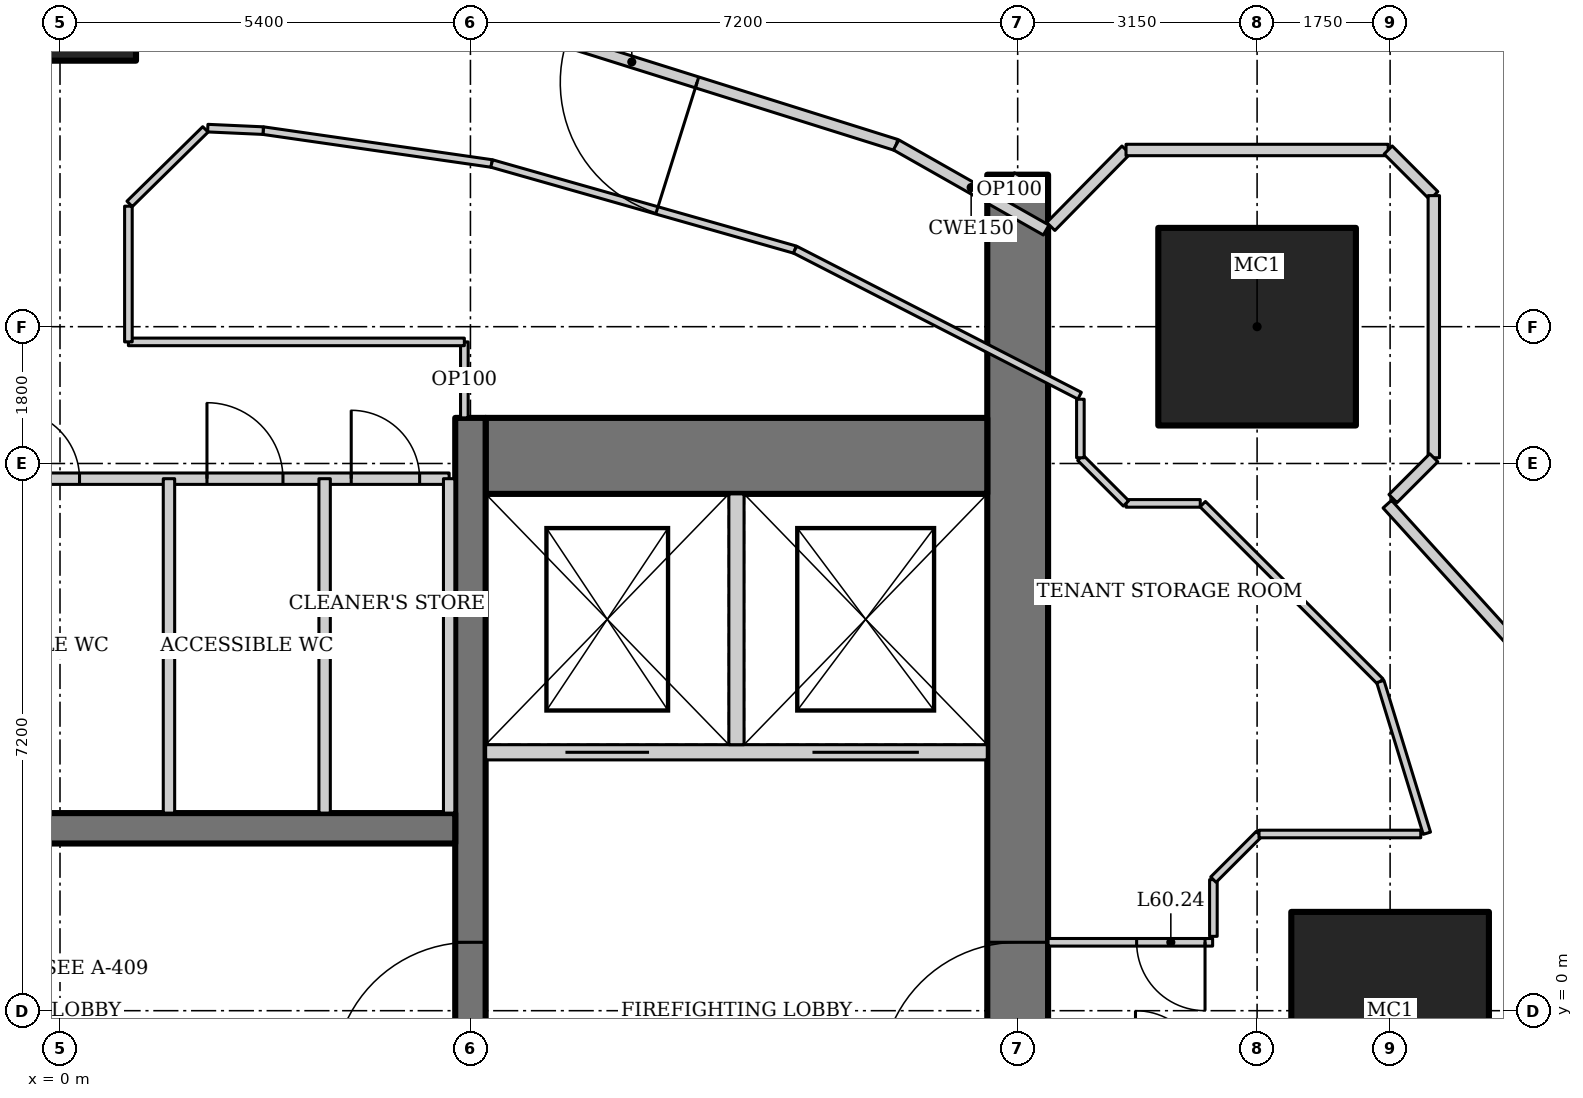
"""IFC4 building model, lengths in metres.
Left out: names, types, materials, properties, quantities, classifications, styles, units other than length and angle.
Written with IfcOpenShell. Run it as: python <this file> out.ifc"""

import sys

from ifc_helpers import new_model, si_unit, direction, frame, frame_2d, origin, origin_2d, place, context, subcontext, project, spatial, rectangle, hollow_rectangle, extrude, element, fill, save


model = new_model("IFC4")
c1 = context("Model", 3, precision=1e-05, world=origin(), true_north=direction((0.0, 1.0)))
c2 = subcontext(c1, "Body", "Model", "MODEL_VIEW")
j1 = project(units=[si_unit("LENGTHUNIT", "METRE"), si_unit("PLANEANGLEUNIT", "RADIAN")], contexts=[c1])
p1 = place(None, origin())
s1 = spatial("IfcSite", under=j1, at=p1, CompositionType="ELEMENT")
p2 = place(p1, origin())
s2 = spatial("IfcBuilding", under=s1, at=p2, CompositionType="ELEMENT")
p3 = place(p2, frame((0.0, 0.0, 257.8)))
s3 = spatial("IfcBuildingStorey", under=s2, at=p3, CompositionType="ELEMENT", Elevation=257.8)
for number, where, z_axis, x_axis in (
    (1, (17.5, 0.0, 0.0), (0.0, 0.0, 1.0), (1.0, 0.0, 0.0)),
    (2, (15.75, 9.0, 0.0), (0.0, 0.0, 1.0), (1.0, 0.0, 0.0)),
):
    element("IfcColumn", number, at=place(p3, frame(where, z_axis=z_axis, x_axis=x_axis)), inside=s3, PredefinedType="COLUMN", context=c2, shape_type="SweptSolid", body=[
        extrude(hollow_rectangle(XDim=2.6, YDim=2.6, WallThickness=0.13, at=origin_2d()), origin(), (0.0, 0.0, 1.0), 4.2),
    ])
p4 = place(p3, frame((0.0, 13.5, 0.0), z_axis=(0.0, 0.0, 1.0), x_axis=(1.0, 0.0, 0.0)))
e3 = element("IfcColumn", 3, at=p4, inside=s3, PredefinedType="COLUMN", context=c2, shape_type="SweptSolid", body=[
    extrude(hollow_rectangle(XDim=2.0, YDim=2.0, WallThickness=0.17, at=origin_2d()), origin(), (0.0, 0.0, 1.0), 4.2),
])
p5 = place(p3, frame((12.6, -11.0, 0.0), z_axis=(0.0, 0.0, 1.0), x_axis=(0.0, 1.0, 0.0)))
e4 = element("IfcWall", 4, at=p5, inside=s3, PredefinedType="SHEAR", context=c2, shape_type="SweptSolid", body=[
    extrude(rectangle(XDim=22.0, YDim=0.8, at=frame_2d((11.0, 0.0))), origin(), (0.0, 0.0, 1.0), 4.2),
])
p6 = place(p5, frame((10.1, 0.0, 0.0)))
e5 = element("IfcOpeningElement", 5, at=p6, cuts=e4, PredefinedType="OPENING", context=c2, shape_type="SweptSolid", body=[
    extrude(rectangle(XDim=1.8, YDim=2.1, at=frame_2d((0.9, 1.05))), frame((0.0, 0.41, 0.0), z_axis=(0.0, -1.0, 0.0), x_axis=(1.0, 0.0, 0.0)), (0.0, 0.0, 1.0), 0.82),
])
p7 = place(p3, frame((12.2, 7.3, 0.0), z_axis=(0.0, 0.0, 1.0), x_axis=(-1.0, 0.0, 0.0)))
e6 = element("IfcWall", 6, at=p7, inside=s3, PredefinedType="SHEAR", context=c2, shape_type="SweptSolid", body=[
    extrude(rectangle(XDim=6.6, YDim=1.0, at=frame_2d((3.3, 0.0))), origin(), (0.0, 0.0, 1.0), 4.2),
])
p8 = place(p3, frame((5.4, -6.8, 0.0), z_axis=(0.0, 0.0, 1.0), x_axis=(0.0, 1.0, 0.0)))
e7 = element("IfcWall", 7, at=p8, inside=s3, PredefinedType="SHEAR", context=c2, shape_type="SweptSolid", body=[
    extrude(rectangle(XDim=14.6, YDim=0.4, at=frame_2d((7.3, 0.0))), origin(), (0.0, 0.0, 1.0), 4.2),
])
p9 = place(p8, frame((5.9, 0.0, 0.0)))
e8 = element("IfcOpeningElement", 8, at=p9, cuts=e7, PredefinedType="OPENING", context=c2, shape_type="SweptSolid", body=[
    extrude(rectangle(XDim=1.8, YDim=2.1, at=frame_2d((0.9, 1.05))), frame((0.0, 0.21, 0.0), z_axis=(0.0, -1.0, 0.0), x_axis=(1.0, 0.0, 0.0)), (0.0, 0.0, 1.0), 0.42),
])
p10 = place(p3, frame((5.2, 2.4, 0.0), z_axis=(0.0, 0.0, 1.0), x_axis=(-1.0, 0.0, 0.0)))
e9 = element("IfcWall", 9, at=p10, inside=s3, PredefinedType="SHEAR", context=c2, shape_type="SweptSolid", body=[
    extrude(rectangle(XDim=10.4, YDim=0.4, at=frame_2d((5.2, 0.0))), origin(), (0.0, 0.0, 1.0), 4.2),
])
p11 = place(p3, frame((12.2, 3.4, 0.0), z_axis=(0.0, 0.0, 1.0), x_axis=(-1.0, 0.0, 0.0)))
e10 = element("IfcWall", 10, at=p11, inside=s3, PredefinedType="SOLIDWALL", context=c2, shape_type="SweptSolid", body=[
    extrude(rectangle(XDim=6.6, YDim=0.2, at=frame_2d((3.3, 0.0))), origin(), (0.0, 0.0, 1.0), 4.2),
])
p12 = place(p11, frame((4.45, 0.0, 0.0)))
e11 = element("IfcOpeningElement", 11, at=p12, cuts=e10, PredefinedType="OPENING", context=c2, shape_type="SweptSolid", body=[
    extrude(rectangle(XDim=1.1, YDim=2.2, at=frame_2d((0.55, 1.1))), frame((0.0, 0.11, 0.0), z_axis=(0.0, -1.0, 0.0), x_axis=(1.0, 0.0, 0.0)), (0.0, 0.0, 1.0), 0.22),
])
p13 = place(p11, frame((0.9, 0.0, 0.0)))
e12 = element("IfcOpeningElement", 12, at=p13, cuts=e10, PredefinedType="OPENING", context=c2, shape_type="SweptSolid", body=[
    extrude(rectangle(XDim=1.4, YDim=2.2, at=frame_2d((0.7, 1.1))), frame((0.0, 0.11, 0.0), z_axis=(0.0, -1.0, 0.0), x_axis=(1.0, 0.0, 0.0)), (0.0, 0.0, 1.0), 0.22),
])
p14 = place(p3, frame((8.9, 3.5, 0.0), z_axis=(0.0, 0.0, 1.0), x_axis=(0.0, 1.0, 0.0)))
e13 = element("IfcWall", 13, at=p14, inside=s3, PredefinedType="SOLIDWALL", context=c2, shape_type="SweptSolid", body=[
    extrude(rectangle(XDim=3.3, YDim=0.2, at=frame_2d((1.65, 0.0))), origin(), (0.0, 0.0, 1.0), 4.2),
])
p15 = place(p3, frame((11.001, 11.392, 0.0), z_axis=(0.0, 0.0, 1.0), x_axis=(-0.954031103669, 0.299707612903, 0.0)))
e14 = element("IfcWall", 14, at=p15, inside=s3, PredefinedType="PARTITIONING", context=c2, shape_type="SweptSolid", body=[
    extrude(rectangle(XDim=4.695, YDim=0.15, at=frame_2d((2.348, 0.0))), origin(), (0.0, 0.0, 1.0), 4.05),
])
p16 = place(p15, frame((2.745, 0.0, 0.0)))
e15 = element("IfcOpeningElement", 15, at=p16, cuts=e14, PredefinedType="OPENING", context=c2, shape_type="SweptSolid", body=[
    extrude(rectangle(XDim=1.8, YDim=2.1, at=frame_2d((0.9, 1.05))), frame((0.0, 0.085, 0.0), z_axis=(0.0, -1.0, 0.0), x_axis=(1.0, 0.0, 0.0)), (0.0, 0.0, 1.0), 0.17),
])
p17 = place(p3, frame((-5.12, 7.0, 0.0), z_axis=(0.0, 0.0, 1.0), x_axis=(1.0, 0.0, 0.0)))
e16 = element("IfcWall", 16, at=p17, inside=s3, PredefinedType="SOLIDWALL", context=c2, shape_type="SweptSolid", body=[
    extrude(rectangle(XDim=10.24, YDim=0.15, at=frame_2d((5.12, 0.0))), origin(), (0.0, 0.0, 1.0), 4.05),
])
p18 = place(p17, frame((1.2, 0.0, 0.0)))
e17 = element("IfcOpeningElement", 17, at=p18, cuts=e16, PredefinedType="OPENING", context=c2, shape_type="SweptSolid", body=[
    extrude(rectangle(XDim=0.9, YDim=2.1, at=frame_2d((0.45, 1.05))), frame((0.0, 0.085, 0.0), z_axis=(0.0, -1.0, 0.0), x_axis=(1.0, 0.0, 0.0)), (0.0, 0.0, 1.0), 0.17),
])
p19 = place(p17, frame((4.477, 0.0, 0.0)))
e18 = element("IfcOpeningElement", 18, at=p19, cuts=e16, PredefinedType="OPENING", context=c2, shape_type="SweptSolid", body=[
    extrude(rectangle(XDim=0.9, YDim=2.1, at=frame_2d((0.45, 1.05))), frame((0.0, 0.085, 0.0), z_axis=(0.0, -1.0, 0.0), x_axis=(1.0, 0.0, 0.0)), (0.0, 0.0, 1.0), 0.17),
])
p20 = place(p17, frame((7.054, 0.0, 0.0)))
e19 = element("IfcOpeningElement", 19, at=p20, cuts=e16, PredefinedType="OPENING", context=c2, shape_type="SweptSolid", body=[
    extrude(rectangle(XDim=1.0, YDim=2.1, at=frame_2d((0.5, 1.05))), frame((0.0, 0.085, 0.0), z_axis=(0.0, -1.0, 0.0), x_axis=(1.0, 0.0, 0.0)), (0.0, 0.0, 1.0), 0.17),
])
p21 = place(p17, frame((8.952, 0.0, 0.0)))
e20 = element("IfcOpeningElement", 20, at=p21, cuts=e16, PredefinedType="OPENING", context=c2, shape_type="SweptSolid", body=[
    extrude(rectangle(XDim=0.9, YDim=2.1, at=frame_2d((0.45, 1.05))), frame((0.0, 0.085, 0.0), z_axis=(0.0, -1.0, 0.0), x_axis=(1.0, 0.0, 0.0)), (0.0, 0.0, 1.0), 0.17),
])
p22 = place(p3, frame((5.12, 2.6, 0.0), z_axis=(0.0, 0.0, 1.0), x_axis=(0.0, 1.0, 0.0)))
e21 = element("IfcWall", 21, at=p22, inside=s3, PredefinedType="SOLIDWALL", context=c2, shape_type="SweptSolid", body=[
    extrude(rectangle(XDim=4.4, YDim=0.15, at=frame_2d((2.2, 0.0))), origin(), (0.0, 0.0, 1.0), 4.05),
])
p23 = place(p3, frame((1.434, 2.6, 0.0), z_axis=(0.0, 0.0, 1.0), x_axis=(0.0, 1.0, 0.0)))
e22 = element("IfcWall", 22, at=p23, inside=s3, PredefinedType="SOLIDWALL", context=c2, shape_type="SweptSolid", body=[
    extrude(rectangle(XDim=4.4, YDim=0.15, at=frame_2d((2.2, 0.0))), origin(), (0.0, 0.0, 1.0), 3.108),
])
p24 = place(p3, frame((3.482, 2.6, 0.0), z_axis=(0.0, 0.0, 1.0), x_axis=(0.0, 1.0, 0.0)))
e23 = element("IfcWall", 23, at=p24, inside=s3, PredefinedType="SOLIDWALL", context=c2, shape_type="SweptSolid", body=[
    extrude(rectangle(XDim=4.4, YDim=0.15, at=frame_2d((2.2, 0.0))), origin(), (0.0, 0.0, 1.0), 4.05),
])
p25 = place(p3, frame((5.32, 7.8, 0.0), z_axis=(0.0, 0.0, 1.0), x_axis=(0.0, 1.0, 0.0)))
e24 = element("IfcWall", 24, at=p25, inside=s3, PredefinedType="PARTITIONING", context=c2, shape_type="SweptSolid", body=[
    extrude(rectangle(XDim=1.0, YDim=0.1, at=frame_2d((0.5, 0.0))), origin(), (0.0, 0.0, 1.0), 4.05),
])
p26 = place(p3, frame((5.32, 8.8, 0.0), z_axis=(0.0, 0.0, 1.0), x_axis=(-1.0, 0.0, 0.0)))
e25 = element("IfcWall", 25, at=p26, inside=s3, PredefinedType="PARTITIONING", context=c2, shape_type="SweptSolid", body=[
    extrude(rectangle(XDim=4.42, YDim=0.1, at=frame_2d((2.21, 0.0))), origin(), (0.0, 0.0, 1.0), 4.05),
])
p27 = place(p3, frame((2.673, 11.58, 0.0), z_axis=(0.0, 0.0, 1.0), x_axis=(0.989805921373, -0.142422744025, 0.0)))
e26 = element("IfcWall", 26, at=p27, inside=s3, PredefinedType="PARTITIONING", context=c2, shape_type="SweptSolid", body=[
    extrude(rectangle(XDim=3.038, YDim=0.1, at=frame_2d((1.519, 0.0))), origin(), (0.0, 0.0, 1.0), 4.05),
])
p28 = place(p3, frame((5.68, 11.147, 0.0), z_axis=(0.0, 0.0, 1.0), x_axis=(0.961973498971, -0.273142796496, 0.0)))
e27 = element("IfcWall", 27, at=p28, inside=s3, PredefinedType="PARTITIONING", context=c2, shape_type="SweptSolid", body=[
    extrude(rectangle(XDim=4.148, YDim=0.1, at=frame_2d((2.074, 0.0))), origin(), (0.0, 0.0, 1.0), 4.05),
])
p29 = place(p3, frame((12.6, 11.0, 0.0), z_axis=(0.0, 0.0, 1.0), x_axis=(-0.493794495037, -0.869578631678, 0.0)))
e28 = element("IfcWall", 28, at=p29, inside=s3, PredefinedType="PARTITIONING", context=c2, shape_type="SweptSolid", body=[
    extrude(rectangle(XDim=0.449, YDim=0.1, at=frame_2d((0.225, 0.0))), origin(), (0.0, 0.0, 1.0), 4.05),
])
p30 = place(p3, frame((0.9, 8.8, 0.0), z_axis=(0.0, 0.0, 1.0), x_axis=(0.0, 1.0, 0.0)))
e29 = element("IfcWall", 29, at=p30, inside=s3, PredefinedType="PARTITIONING", context=c2, shape_type="SweptSolid", body=[
    extrude(rectangle(XDim=1.785, YDim=0.1, at=frame_2d((0.893, 0.0))), origin(), (0.0, 0.0, 1.0), 4.05),
])
p31 = place(p3, frame((1.944, 11.613, 0.0), z_axis=(0.0, 0.0, 1.0), x_axis=(0.99899525873, -0.04481599085, 0.0)))
e30 = element("IfcWall", 30, at=p31, inside=s3, PredefinedType="PARTITIONING", context=c2, shape_type="SweptSolid", body=[
    extrude(rectangle(XDim=0.73, YDim=0.1, at=frame_2d((0.365, 0.0))), origin(), (0.0, 0.0, 1.0), 4.05),
])
p32 = place(p3, frame((1.913, 11.596, 0.0), z_axis=(0.0, 0.0, 1.0), x_axis=(-0.71318945388, -0.70097132814, 0.0)))
e31 = element("IfcWall", 31, at=p32, inside=s3, PredefinedType="PARTITIONING", context=c2, shape_type="SweptSolid", body=[
    extrude(rectangle(XDim=1.399, YDim=0.1, at=frame_2d((0.699, 0.0))), origin(), (0.0, 0.0, 1.0), 4.05),
])
p33 = place(p3, frame((19.172, 4.78, 0.0), z_axis=(0.0, 0.0, 1.0), x_axis=(-0.671721890643, 0.74080341632, 0.0)))
e32 = element("IfcWall", 32, at=p33, inside=s3, PredefinedType="PARTITIONING", context=c2, shape_type="SweptSolid", body=[
    extrude(rectangle(XDim=2.544, YDim=0.15, at=frame_2d((1.272, 0.0))), origin(), (0.0, 0.0, 1.0), 4.05),
])
p34 = place(p3, frame((12.975, 10.271, 0.0), z_axis=(0.0, 0.0, 1.0), x_axis=(-0.869722107117, 0.493541747366, 0.0)))
e33 = element("IfcWall", 33, at=p34, inside=s3, PredefinedType="PARTITIONING", context=c2, shape_type="SweptSolid", body=[
    extrude(rectangle(XDim=2.27, YDim=0.15, at=frame_2d((1.135, 0.0))), origin(), (0.0, 0.0, 1.0), 4.05),
])
p35 = place(p3, frame((9.67, 10.014, 0.0), z_axis=(0.0, 0.0, 1.0), x_axis=(0.889620520549, -0.45670048108, 0.0)))
e34 = element("IfcWall", 34, at=p35, inside=s3, PredefinedType="PARTITIONING", context=c2, shape_type="SweptSolid", body=[
    extrude(rectangle(XDim=4.209, YDim=0.1, at=frame_2d((2.104, 0.0))), origin(), (0.0, 0.0, 1.0), 4.05),
])
p36 = place(p3, frame((15.035, 6.665, 0.0), z_axis=(0.0, 0.0, 1.0), x_axis=(0.707587114823, -0.70662612104, 0.0)))
e35 = element("IfcWall", 35, at=p36, inside=s3, PredefinedType="PARTITIONING", context=c2, shape_type="SweptSolid", body=[
    extrude(rectangle(XDim=3.303, YDim=0.1, at=frame_2d((1.651, 0.0))), origin(), (0.0, 0.0, 1.0), 4.05),
])
p37 = place(p3, frame((15.002, 6.675, 0.0), z_axis=(0.0, 0.0, 1.0), x_axis=(-1.0, 0.0, 0.0)))
e36 = element("IfcWall", 36, at=p37, inside=s3, PredefinedType="PARTITIONING", context=c2, shape_type="SweptSolid", body=[
    extrude(rectangle(XDim=0.977, YDim=0.1, at=frame_2d((0.488, 0.0))), origin(), (0.0, 0.0, 1.0), 4.05),
])
p38 = place(p3, frame((14.025, 6.675, 0.0), z_axis=(0.0, 0.0, 1.0), x_axis=(-0.707106781187, 0.707106781187, 0.0)))
e37 = element("IfcWall", 37, at=p38, inside=s3, PredefinedType="PARTITIONING", context=c2, shape_type="SweptSolid", body=[
    extrude(rectangle(XDim=0.849, YDim=0.1, at=frame_2d((0.425, 0.0))), origin(), (0.0, 0.0, 1.0), 4.05),
])
p39 = place(p3, frame((13.425, 7.275, 0.0), z_axis=(0.0, 0.0, 1.0), x_axis=(0.0, 1.0, 0.0)))
e38 = element("IfcWall", 38, at=p39, inside=s3, PredefinedType="PARTITIONING", context=c2, shape_type="SweptSolid", body=[
    extrude(rectangle(XDim=0.77, YDim=0.1, at=frame_2d((0.385, 0.0))), origin(), (0.0, 0.0, 1.0), 4.05),
])
p40 = place(p3, frame((13.036, 10.319, 0.0), z_axis=(0.0, 0.0, 1.0), x_axis=(0.701113567316, 0.713049623606, 0.0)))
e39 = element("IfcWall", 39, at=p40, inside=s3, PredefinedType="PARTITIONING", context=c2, shape_type="SweptSolid", body=[
    extrude(rectangle(XDim=1.411, YDim=0.15, at=frame_2d((0.706, 0.0))), origin(), (0.0, 0.0, 1.0), 4.05),
])
p41 = place(p3, frame((14.025, 11.325, 0.0), z_axis=(0.0, 0.0, 1.0), x_axis=(1.0, 0.0, 0.0)))
e40 = element("IfcWall", 40, at=p41, inside=s3, PredefinedType="PARTITIONING", context=c2, shape_type="SweptSolid", body=[
    extrude(rectangle(XDim=3.449, YDim=0.15, at=frame_2d((1.725, 0.0))), origin(), (0.0, 0.0, 1.0), 4.05),
])
p42 = place(p3, frame((17.475, 11.325, 0.0), z_axis=(0.0, 0.0, 1.0), x_axis=(0.707106781187, -0.707106781187, 0.0)))
e41 = element("IfcWall", 41, at=p42, inside=s3, PredefinedType="PARTITIONING", context=c2, shape_type="SweptSolid", body=[
    extrude(rectangle(XDim=0.849, YDim=0.15, at=frame_2d((0.425, 0.0))), origin(), (0.0, 0.0, 1.0), 4.05),
])
p43 = place(p3, frame((18.075, 10.725, 0.0), z_axis=(0.0, 0.0, 1.0), x_axis=(0.0, -1.0, 0.0)))
e42 = element("IfcWall", 42, at=p43, inside=s3, PredefinedType="PARTITIONING", context=c2, shape_type="SweptSolid", body=[
    extrude(rectangle(XDim=3.449, YDim=0.15, at=frame_2d((1.725, 0.0))), origin(), (0.0, 0.0, 1.0), 3.6),
])
p44 = place(p3, frame((18.075, 7.275, 0.0), z_axis=(0.0, 0.0, 1.0), x_axis=(-0.707106781187, -0.707106781187, 0.0)))
e43 = element("IfcWall", 43, at=p44, inside=s3, PredefinedType="PARTITIONING", context=c2, shape_type="SweptSolid", body=[
    extrude(rectangle(XDim=0.76, YDim=0.15, at=frame_2d((0.38, 0.0))), origin(), (0.0, 0.0, 1.0), 4.05),
])
p45 = place(p3, frame((17.372, 4.331, 0.0), z_axis=(0.0, 0.0, 1.0), x_axis=(0.293231279211, -0.956041535129, 0.0)))
e44 = element("IfcWall", 44, at=p45, inside=s3, PredefinedType="PARTITIONING", context=c2, shape_type="SweptSolid", body=[
    extrude(rectangle(XDim=2.088, YDim=0.1, at=frame_2d((1.044, 0.0))), origin(), (0.0, 0.0, 1.0), 4.05),
])
p46 = place(p3, frame((15.165, 0.9, 0.0), z_axis=(0.0, 0.0, 1.0), x_axis=(-1.0, 0.0, 0.0)))
e45 = element("IfcWall", 45, at=p46, inside=s3, PredefinedType="PARTITIONING", context=c2, shape_type="SweptSolid", body=[
    extrude(rectangle(XDim=2.165, YDim=0.1, at=frame_2d((1.083, 0.0))), origin(), (0.0, 0.0, 1.0), 4.05),
])
p47 = place(p46, frame((0.1, 0.0, 0.0)))
e46 = element("IfcOpeningElement", 46, at=p47, cuts=e45, PredefinedType="OPENING", context=c2, shape_type="SweptSolid", body=[
    extrude(rectangle(XDim=0.9, YDim=2.1, at=frame_2d((0.45, 1.05))), frame((0.0, 0.06, 0.0), z_axis=(0.0, -1.0, 0.0), x_axis=(1.0, 0.0, 0.0)), (0.0, 0.0, 1.0), 0.12),
])
p48 = place(p3, frame((15.175, 0.978, 0.0), z_axis=(0.0, 0.0, 1.0), x_axis=(0.0, 1.0, 0.0)))
e47 = element("IfcWall", 47, at=p48, inside=s3, PredefinedType="PARTITIONING", context=c2, shape_type="SweptSolid", body=[
    extrude(rectangle(XDim=0.746, YDim=0.1, at=frame_2d((0.373, 0.0))), origin(), (0.0, 0.0, 1.0), 4.05),
])
p49 = place(p3, frame((15.175, 1.725, 0.0), z_axis=(0.0, 0.0, 1.0), x_axis=(0.707106781187, 0.707106781187, 0.0)))
e48 = element("IfcWall", 48, at=p49, inside=s3, PredefinedType="PARTITIONING", context=c2, shape_type="SweptSolid", body=[
    extrude(rectangle(XDim=0.849, YDim=0.1, at=frame_2d((0.425, 0.0))), origin(), (0.0, 0.0, 1.0), 4.05),
])
p50 = place(p3, frame((15.775, 2.325, 0.0), z_axis=(0.0, 0.0, 1.0), x_axis=(1.0, 0.0, 0.0)))
e49 = element("IfcWall", 49, at=p50, inside=s3, PredefinedType="PARTITIONING", context=c2, shape_type="SweptSolid", body=[
    extrude(rectangle(XDim=2.128, YDim=0.1, at=frame_2d((1.064, 0.0))), origin(), (0.0, 0.0, 1.0), 4.05),
])
p51 = place(p9, origin())
e50 = element("IfcDoor", 50, at=p51, inside=s3, OperationType="DOUBLE_DOOR_DOUBLE_SWING", PredefinedType="DOOR", context=c2, shape_type="SweptSolid", body=[
    extrude(rectangle(XDim=1.8, YDim=2.1, at=frame_2d((0.9, 1.05))), frame((0.0, 0.025, 0.0), z_axis=(0.0, -1.0, 0.0), x_axis=(1.0, 0.0, 0.0)), (0.0, 0.0, 1.0), 0.05),
])
fill(e8, e50)
p52 = place(p6, origin())
e51 = element("IfcDoor", 51, at=p52, inside=s3, OperationType="DOUBLE_DOOR_DOUBLE_SWING", PredefinedType="DOOR", context=c2, shape_type="SweptSolid", body=[
    extrude(rectangle(XDim=1.8, YDim=2.1, at=frame_2d((0.9, 1.05))), frame((0.0, 0.025, 0.0), z_axis=(0.0, -1.0, 0.0), x_axis=(1.0, 0.0, 0.0)), (0.0, 0.0, 1.0), 0.05),
])
fill(e5, e51)
p53 = place(p12, origin())
e52 = element("IfcDoor", 52, at=p53, inside=s3, OperationType="DOUBLE_DOOR_SLIDING", PredefinedType="DOOR", context=c2, shape_type="SweptSolid", body=[
    extrude(rectangle(XDim=1.1, YDim=2.2, at=frame_2d((0.55, 1.1))), frame((0.0, 0.025, 0.0), z_axis=(0.0, -1.0, 0.0), x_axis=(1.0, 0.0, 0.0)), (0.0, 0.0, 1.0), 0.05),
])
fill(e11, e52)
p54 = place(p13, origin())
e53 = element("IfcDoor", 53, at=p54, inside=s3, OperationType="DOUBLE_DOOR_SLIDING", PredefinedType="DOOR", context=c2, shape_type="SweptSolid", body=[
    extrude(rectangle(XDim=1.4, YDim=2.2, at=frame_2d((0.7, 1.1))), frame((0.0, 0.025, 0.0), z_axis=(0.0, -1.0, 0.0), x_axis=(1.0, 0.0, 0.0)), (0.0, 0.0, 1.0), 0.05),
])
fill(e12, e53)
p55 = place(p19, origin())
e54 = element("IfcDoor", 54, at=p55, inside=s3, OperationType="SINGLE_SWING_LEFT", PredefinedType="DOOR", context=c2, shape_type="SweptSolid", body=[
    extrude(rectangle(XDim=0.9, YDim=2.1, at=frame_2d((0.45, 1.05))), frame((0.0, 0.025, 0.0), z_axis=(0.0, -1.0, 0.0), x_axis=(1.0, 0.0, 0.0)), (0.0, 0.0, 1.0), 0.05),
])
fill(e18, e54)
p56 = place(p20, origin())
e55 = element("IfcDoor", 55, at=p56, inside=s3, OperationType="SINGLE_SWING_LEFT", PredefinedType="DOOR", context=c2, shape_type="SweptSolid", body=[
    extrude(rectangle(XDim=1.0, YDim=2.1, at=frame_2d((0.5, 1.05))), frame((0.0, 0.025, 0.0), z_axis=(0.0, -1.0, 0.0), x_axis=(1.0, 0.0, 0.0)), (0.0, 0.0, 1.0), 0.05),
])
fill(e19, e55)
p57 = place(p21, origin())
e56 = element("IfcDoor", 56, at=p57, inside=s3, OperationType="SINGLE_SWING_LEFT", PredefinedType="DOOR", context=c2, shape_type="SweptSolid", body=[
    extrude(rectangle(XDim=0.9, YDim=2.1, at=frame_2d((0.45, 1.05))), frame((0.0, 0.025, 0.0), z_axis=(0.0, -1.0, 0.0), x_axis=(1.0, 0.0, 0.0)), (0.0, 0.0, 1.0), 0.05),
])
fill(e20, e56)
p58 = place(p47, origin())
e57 = element("IfcDoor", 57, at=p58, inside=s3, OperationType="SINGLE_SWING_LEFT", PredefinedType="DOOR", context=c2, shape_type="SweptSolid", body=[
    extrude(rectangle(XDim=0.9, YDim=2.1, at=frame_2d((0.45, 1.05))), frame((0.0, 0.025, 0.0), z_axis=(0.0, -1.0, 0.0), x_axis=(1.0, 0.0, 0.0)), (0.0, 0.0, 1.0), 0.05),
])
fill(e46, e57)
p59 = place(p16, origin())
e58 = element("IfcDoor", 58, at=p59, inside=s3, OperationType="DOUBLE_DOOR_DOUBLE_SWING", PredefinedType="DOOR", context=c2, shape_type="SweptSolid", body=[
    extrude(rectangle(XDim=1.8, YDim=2.1, at=frame_2d((0.9, 1.05))), frame((0.0, 0.025, 0.0), z_axis=(0.0, -1.0, 0.0), x_axis=(1.0, 0.0, 0.0)), (0.0, 0.0, 1.0), 0.05),
])
fill(e15, e58)
save(model, sys.argv[1])
